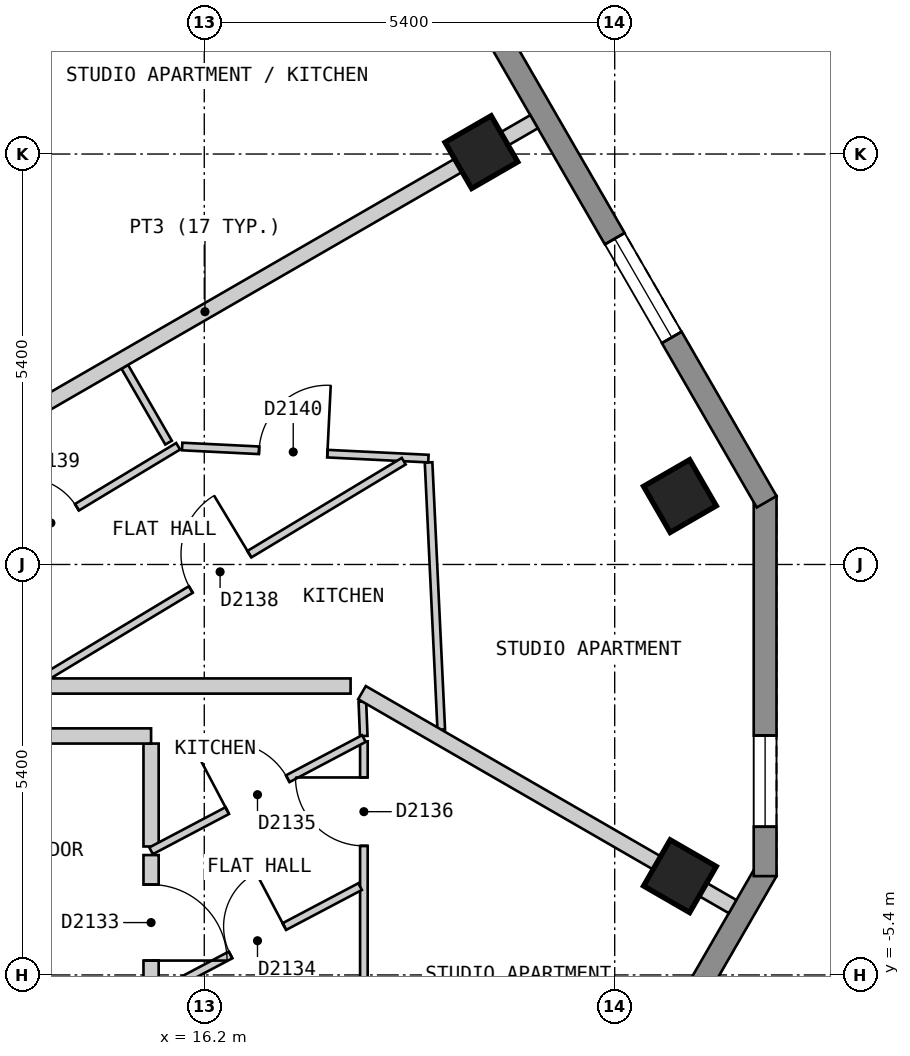
"""IFC4 building model, lengths in metres.
Left out: names, types, materials, properties, quantities, classifications, styles, units other than length and angle.
Written with IfcOpenShell. Run it as: python <this file> out.ifc"""

import sys

from ifc_helpers import new_model, si_unit, direction, frame, frame_2d, origin, origin_2d, place, context, subcontext, project, spatial, polyline, rectangle, outline, extrude, element, fill, save


model = new_model("IFC4")
c1 = context("Model", 3, precision=1e-05, world=origin(), true_north=direction((0.0, 1.0)))
c2 = subcontext(c1, "Body", "Model", "MODEL_VIEW")
j1 = project(units=[si_unit("LENGTHUNIT", "METRE"), si_unit("PLANEANGLEUNIT", "RADIAN")], contexts=[c1])
p1 = place(None, origin())
s1 = spatial("IfcSite", under=j1, at=p1, CompositionType="ELEMENT")
p2 = place(p1, origin())
s2 = spatial("IfcBuilding", under=s1, at=p2, CompositionType="ELEMENT")
p3 = place(p2, frame((0.0, 0.0, 211.8)))
s3 = spatial("IfcBuildingStorey", under=s2, at=p3, CompositionType="ELEMENT", Elevation=211.8)
for number, where, z_axis, x_axis in (
    (1, (22.458, -4.101, 0.0), (0.0, 0.0, 1.0), (0.5, 0.866, 0.0)),
    (2, (22.458, 0.9, 0.0), (0.0, 0.0, 1.0), (-0.5, 0.866, 0.0)),
    (3, (19.846, 5.425, 0.0), (0.0, 0.0, 1.0), (-0.5, 0.866, 0.0)),
):
    element("IfcColumn", number, at=place(p3, frame(where, z_axis=z_axis, x_axis=x_axis)), inside=s3, PredefinedType="COLUMN", context=c2, shape_type="SweptSolid", body=[
        extrude(rectangle(XDim=0.7, YDim=0.7, at=origin_2d()), origin(), (0.0, 0.0, 1.0), 3.0),
    ])
p4 = place(p3, frame((15.285, -18.425, 0.0), z_axis=(0.0, 0.0, 1.0), x_axis=(0.500012653391, 0.866018098222, 0.0)))
e4 = element("IfcWall", 4, at=p4, inside=s3, PredefinedType="SOLIDWALL", context=c2, shape_type="SweptSolid", body=[
    extrude(outline(polyline([(0.0, -0.15), (16.628, -0.15), (16.548, 0.15), (0.08, 0.15), (0.0, -0.15)])), origin(), (0.0, 0.0, 1.0), 2.7),
])
p5 = place(p4, frame((2.444, 0.0, 0.15)))
e5 = element("IfcOpeningElement", 5, at=p5, cuts=e4, PredefinedType="OPENING", context=c2, shape_type="SweptSolid", body=[
    extrude(rectangle(XDim=1.5, YDim=2.1, at=frame_2d((0.75, 1.05))), frame((0.0, 0.16, 0.0), z_axis=(0.0, -1.0, 0.0), x_axis=(1.0, 0.0, 0.0)), (0.0, 0.0, 1.0), 0.32),
])
p6 = place(p4, frame((7.564, 0.0, 0.15)))
e6 = element("IfcOpeningElement", 6, at=p6, cuts=e4, PredefinedType="OPENING", context=c2, shape_type="SweptSolid", body=[
    extrude(rectangle(XDim=1.5, YDim=2.1, at=frame_2d((0.75, 1.05))), frame((0.0, 0.16, 0.0), z_axis=(0.0, -1.0, 0.0), x_axis=(1.0, 0.0, 0.0)), (0.0, 0.0, 1.0), 0.32),
])
p7 = place(p4, frame((12.682, 0.0, 0.15)))
e7 = element("IfcOpeningElement", 7, at=p7, cuts=e4, PredefinedType="OPENING", context=c2, shape_type="SweptSolid", body=[
    extrude(rectangle(XDim=1.5, YDim=2.1, at=frame_2d((0.75, 1.05))), frame((0.0, 0.16, 0.0), z_axis=(0.0, -1.0, 0.0), x_axis=(1.0, 0.0, 0.0)), (0.0, 0.0, 1.0), 0.32),
])
p8 = place(p3, frame((23.579, -4.1, 0.0), z_axis=(0.0, 0.0, 1.0), x_axis=(0.0, 1.0, 0.0)))
e8 = element("IfcWall", 8, at=p8, inside=s3, PredefinedType="SOLIDWALL", context=c2, shape_type="SweptSolid", body=[
    extrude(outline(polyline([(0.0, -0.15), (5.0, -0.15), (4.92, 0.15), (0.08, 0.15), (0.0, -0.15)])), origin(), (0.0, 0.0, 1.0), 2.7),
])
p9 = place(p8, frame((0.65, 0.0, 0.15)))
e9 = element("IfcOpeningElement", 9, at=p9, cuts=e8, PredefinedType="OPENING", context=c2, shape_type="SweptSolid", body=[
    extrude(rectangle(XDim=1.2, YDim=2.1, at=frame_2d((0.6, 1.05))), frame((0.0, 0.16, 0.0), z_axis=(0.0, -1.0, 0.0), x_axis=(1.0, 0.0, 0.0)), (0.0, 0.0, 1.0), 0.32),
])
p10 = place(p3, frame((23.599, 0.825, 0.0), z_axis=(0.0, 0.0, 1.0), x_axis=(-0.500003656944, 0.866023292436, 0.0)))
e10 = element("IfcWall", 10, at=p10, inside=s3, PredefinedType="SOLIDWALL", context=c2, shape_type="SweptSolid", body=[
    extrude(outline(polyline([(0.0, -0.15), (22.17, -0.15), (22.09, 0.15), (0.08, 0.15), (0.0, -0.15)])), origin(), (0.0, 0.0, 1.0), 2.7),
])
p11 = place(p10, frame((2.497, 0.0, 0.15)))
e11 = element("IfcOpeningElement", 11, at=p11, cuts=e10, PredefinedType="OPENING", context=c2, shape_type="SweptSolid", body=[
    extrude(rectangle(XDim=1.5, YDim=2.1, at=frame_2d((0.75, 1.05))), frame((0.0, 0.16, 0.0), z_axis=(0.0, -1.0, 0.0), x_axis=(1.0, 0.0, 0.0)), (0.0, 0.0, 1.0), 0.32),
])
p12 = place(p10, frame((7.723, 0.0, 0.15)))
e12 = element("IfcOpeningElement", 12, at=p12, cuts=e10, PredefinedType="OPENING", context=c2, shape_type="SweptSolid", body=[
    extrude(rectangle(XDim=1.5, YDim=2.1, at=frame_2d((0.75, 1.05))), frame((0.0, 0.16, 0.0), z_axis=(0.0, -1.0, 0.0), x_axis=(1.0, 0.0, 0.0)), (0.0, 0.0, 1.0), 0.32),
])
p13 = place(p10, frame((12.948, 0.0, 0.15)))
e13 = element("IfcOpeningElement", 13, at=p13, cuts=e10, PredefinedType="OPENING", context=c2, shape_type="SweptSolid", body=[
    extrude(rectangle(XDim=1.5, YDim=2.1, at=frame_2d((0.75, 1.05))), frame((0.0, 0.16, 0.0), z_axis=(0.0, -1.0, 0.0), x_axis=(1.0, 0.0, 0.0)), (0.0, 0.0, 1.0), 0.32),
])
p14 = place(p10, frame((18.173, 0.0, 0.15)))
e14 = element("IfcOpeningElement", 14, at=p14, cuts=e10, PredefinedType="OPENING", context=c2, shape_type="SweptSolid", body=[
    extrude(rectangle(XDim=1.5, YDim=2.1, at=frame_2d((0.75, 1.05))), frame((0.0, 0.16, 0.0), z_axis=(0.0, -1.0, 0.0), x_axis=(1.0, 0.0, 0.0)), (0.0, 0.0, 1.0), 0.32),
])
p15 = place(p3, frame((15.5, -2.356, 0.0), z_axis=(0.0, 0.0, 1.0), x_axis=(0.0, -1.0, 0.0)))
e15 = element("IfcWall", 15, at=p15, inside=s3, PredefinedType="PARTITIONING", context=c2, shape_type="SweptSolid", body=[
    extrude(rectangle(XDim=1.354, YDim=0.2, at=frame_2d((0.677, 0.0))), origin(), (0.0, 0.0, 1.0), 2.7),
])
p16 = place(p3, frame((12.902, -2.256, 0.0), z_axis=(0.0, 0.0, 1.0), x_axis=(1.0, 0.0, 0.0)))
e16 = element("IfcWall", 16, at=p16, inside=s3, PredefinedType="PARTITIONING", context=c2, shape_type="SweptSolid", body=[
    extrude(rectangle(XDim=2.598, YDim=0.2, at=frame_2d((1.299, 0.0))), origin(), (0.0, 0.0, 1.0), 2.7),
])
p17 = place(p3, frame((15.5, -5.879, 0.0), z_axis=(0.0, 0.0, 1.0), x_axis=(0.0, 1.0, 0.0)))
e17 = element("IfcWall", 17, at=p17, inside=s3, PredefinedType="PARTITIONING", context=c2, shape_type="SweptSolid", body=[
    extrude(rectangle(XDim=2.056, YDim=0.2, at=frame_2d((1.028, 0.0))), origin(), (0.0, 0.0, 1.0), 2.7),
])
p18 = place(p17, frame((0.668, 0.0, 0.0)))
e18 = element("IfcOpeningElement", 18, at=p18, cuts=e17, PredefinedType="OPENING", context=c2, shape_type="SweptSolid", body=[
    extrude(rectangle(XDim=1.0, YDim=2.1, at=frame_2d((0.5, 1.05))), frame((0.0, 0.11, 0.0), z_axis=(0.0, -1.0, 0.0), x_axis=(1.0, 0.0, 0.0)), (0.0, 0.0, 1.0), 0.22),
])
p19 = place(p3, frame((15.154, 2.601, 0.0), z_axis=(0.0, 0.0, 1.0), x_axis=(0.499808046739, -0.866136199691, 0.0)))
e19 = element("IfcWall", 19, at=p19, inside=s3, PredefinedType="PARTITIONING", context=c2, shape_type="SweptSolid", body=[
    extrude(rectangle(XDim=1.152, YDim=0.1, at=frame_2d((0.576, 0.0))), origin(), (0.0, 0.0, 1.0), 2.7),
])
p20 = place(p3, frame((18.28, -1.804, 0.0), z_axis=(0.0, 0.0, 1.0), x_axis=(0.039839036731, -0.999206110446, 0.0)))
e20 = element("IfcWall", 20, at=p20, inside=s3, PredefinedType="PARTITIONING", context=c2, shape_type="SweptSolid", body=[
    extrude(rectangle(XDim=0.453, YDim=0.1, at=frame_2d((0.227, 0.0))), origin(), (0.0, 0.0, 1.0), 2.7),
])
p21 = place(p3, frame((19.151, 1.343, 0.0), z_axis=(0.0, 0.0, 1.0), x_axis=(0.047509130714, -0.998870803707, 0.0)))
e21 = element("IfcWall", 21, at=p21, inside=s3, PredefinedType="PARTITIONING", context=c2, shape_type="SweptSolid", body=[
    extrude(rectangle(XDim=3.52, YDim=0.1, at=frame_2d((1.76, 0.0))), origin(), (0.0, 0.0, 1.0), 2.7),
])
p22 = place(p3, frame((15.909, 1.552, 0.0), z_axis=(0.0, 0.0, 1.0), x_axis=(0.998799003463, -0.048995414909, 0.0)))
e22 = element("IfcWall", 22, at=p22, inside=s3, PredefinedType="PARTITIONING", context=c2, shape_type="SweptSolid", body=[
    extrude(rectangle(XDim=3.244, YDim=0.1, at=frame_2d((1.622, 0.0))), origin(), (0.0, 0.0, 1.0), 2.7),
])
p23 = place(p22, frame((1.013, 0.0, 0.0)))
e23 = element("IfcOpeningElement", 23, at=p23, cuts=e22, PredefinedType="OPENING", context=c2, shape_type="SweptSolid", body=[
    extrude(rectangle(XDim=0.9, YDim=2.1, at=frame_2d((0.45, 1.05))), frame((0.0, 0.06, 0.0), z_axis=(0.0, -1.0, 0.0), x_axis=(1.0, 0.0, 0.0)), (0.0, 0.0, 1.0), 0.12),
])
p24 = place(p3, frame((18.3, -7.496, 0.0), z_axis=(0.0, 0.0, 1.0), x_axis=(0.0, 1.0, 0.0)))
e24 = element("IfcWall", 24, at=p24, inside=s3, PredefinedType="PARTITIONING", context=c2, shape_type="SweptSolid", body=[
    extrude(rectangle(XDim=5.17, YDim=0.1, at=frame_2d((2.585, 0.0))), origin(), (0.0, 0.0, 1.0), 2.7),
])
p25 = place(p24, frame((3.794, 0.0, 0.0)))
e25 = element("IfcOpeningElement", 25, at=p25, cuts=e24, PredefinedType="OPENING", context=c2, shape_type="SweptSolid", body=[
    extrude(rectangle(XDim=0.9, YDim=2.1, at=frame_2d((0.45, 1.05))), frame((0.0, 0.06, 0.0), z_axis=(0.0, -1.0, 0.0), x_axis=(1.0, 0.0, 0.0)), (0.0, 0.0, 1.0), 0.12),
])
p26 = place(p3, frame((15.5, -3.767, 0.0), z_axis=(0.0, 0.0, 1.0), x_axis=(0.884482889541, 0.466572628976, 0.0)))
e26 = element("IfcWall", 26, at=p26, inside=s3, PredefinedType="PARTITIONING", context=c2, shape_type="SweptSolid", body=[
    extrude(rectangle(XDim=3.166, YDim=0.1, at=frame_2d((1.583, 0.0))), origin(), (0.0, 0.0, 1.0), 2.7),
])
p27 = place(p26, frame((1.133, 0.0, 0.0)))
e27 = element("IfcOpeningElement", 27, at=p27, cuts=e26, PredefinedType="OPENING", context=c2, shape_type="SweptSolid", body=[
    extrude(rectangle(XDim=0.9, YDim=2.1, at=frame_2d((0.45, 1.05))), frame((0.0, 0.06, 0.0), z_axis=(0.0, -1.0, 0.0), x_axis=(1.0, 0.0, 0.0)), (0.0, 0.0, 1.0), 0.12),
])
p28 = place(p3, frame((15.6, -5.636, 0.0), z_axis=(0.0, 0.0, 1.0), x_axis=(0.884468832747, 0.466599275503, 0.0)))
e28 = element("IfcWall", 28, at=p28, inside=s3, PredefinedType="PARTITIONING", context=c2, shape_type="SweptSolid", body=[
    extrude(rectangle(XDim=2.996, YDim=0.1, at=frame_2d((1.498, 0.0))), origin(), (0.0, 0.0, 1.0), 2.7),
])
p29 = place(p28, frame((1.07, 0.0, 0.0)))
e29 = element("IfcOpeningElement", 29, at=p29, cuts=e28, PredefinedType="OPENING", context=c2, shape_type="SweptSolid", body=[
    extrude(rectangle(XDim=0.8, YDim=2.1, at=frame_2d((0.4, 1.05))), frame((0.0, 0.06, 0.0), z_axis=(0.0, -1.0, 0.0), x_axis=(1.0, 0.0, 0.0)), (0.0, 0.0, 1.0), 0.12),
])
p30 = place(p3, frame((12.593, -0.411, 0.0), z_axis=(0.0, 0.0, 1.0), x_axis=(0.856558445359, 0.516050026339, 0.0)))
e30 = element("IfcWall", 30, at=p30, inside=s3, PredefinedType="PARTITIONING", context=c2, shape_type="SweptSolid", body=[
    extrude(rectangle(XDim=3.809, YDim=0.1, at=frame_2d((1.905, 0.0))), origin(), (0.0, 0.0, 1.0), 2.7),
])
p31 = place(p30, frame((1.455, 0.0, 0.0)))
e31 = element("IfcOpeningElement", 31, at=p31, cuts=e30, PredefinedType="OPENING", context=c2, shape_type="SweptSolid", body=[
    extrude(rectangle(XDim=0.8, YDim=2.1, at=frame_2d((0.4, 1.05))), frame((0.0, 0.06, 0.0), z_axis=(0.0, -1.0, 0.0), x_axis=(1.0, 0.0, 0.0)), (0.0, 0.0, 1.0), 0.12),
])
p32 = place(p3, frame((14.081, -1.499, 0.0), z_axis=(0.0, 0.0, 1.0), x_axis=(0.85652273816, 0.516109289798, 0.0)))
e32 = element("IfcWall", 32, at=p32, inside=s3, PredefinedType="PARTITIONING", context=c2, shape_type="SweptSolid", body=[
    extrude(rectangle(XDim=5.537, YDim=0.1, at=frame_2d((2.769, 0.0))), origin(), (0.0, 0.0, 1.0), 2.7),
])
p33 = place(p32, frame((2.267, 0.0, 0.0)))
e33 = element("IfcOpeningElement", 33, at=p33, cuts=e32, PredefinedType="OPENING", context=c2, shape_type="SweptSolid", body=[
    extrude(rectangle(XDim=0.9, YDim=2.1, at=frame_2d((0.45, 1.05))), frame((0.0, 0.06, 0.0), z_axis=(0.0, -1.0, 0.0), x_axis=(1.0, 0.0, 0.0)), (0.0, 0.0, 1.0), 0.12),
])
p34 = place(p3, frame((18.275, -1.686, 0.0), z_axis=(0.0, 0.0, 1.0), x_axis=(0.866041167766, -0.49997269499, 0.0)))
e34 = element("IfcWall", 34, at=p34, inside=s3, PredefinedType="PARTITIONING", context=c2, shape_type="SweptSolid", body=[
    extrude(rectangle(XDim=5.63, YDim=0.2, at=frame_2d((2.815, 0.0))), origin(), (0.0, 0.0, 1.0), 2.7),
])
p35 = place(p3, frame((13.163, -1.599, 0.0), z_axis=(0.0, 0.0, 1.0), x_axis=(1.0, 0.0, 0.0)))
e35 = element("IfcWall", 35, at=p35, inside=s3, PredefinedType="PARTITIONING", context=c2, shape_type="SweptSolid", body=[
    extrude(rectangle(XDim=4.962, YDim=0.2, at=frame_2d((2.481, 0.0))), origin(), (0.0, 0.0, 1.0), 2.7),
])
p36 = place(p3, frame((11.879, 0.826, 0.0), z_axis=(0.0, 0.0, 1.0), x_axis=(0.866065245018, 0.499930986609, 0.0)))
e36 = element("IfcWall", 36, at=p36, inside=s3, PredefinedType="PARTITIONING", context=c2, shape_type="SweptSolid", body=[
    extrude(rectangle(XDim=10.0, YDim=0.2, at=frame_2d((5.0, 0.0))), origin(), (0.0, 0.0, 1.0), 2.7),
])
p37 = place(p3, frame((9.354, 5.401, 0.0), z_axis=(0.0, 0.0, 1.0), x_axis=(0.866018411306, 0.500012111133, 0.0)))
e37 = element("IfcWall", 37, at=p37, inside=s3, PredefinedType="PARTITIONING", context=c2, shape_type="SweptSolid", body=[
    extrude(rectangle(XDim=9.898, YDim=0.2, at=frame_2d((4.949, 0.0))), origin(), (0.0, 0.0, 1.0), 2.7),
])
p38 = place(p9, origin())
e38 = element("IfcWindow", 38, at=p38, inside=s3, PartitioningType="SINGLE_PANEL", PredefinedType="WINDOW", context=c2, shape_type="SweptSolid", body=[
    extrude(rectangle(XDim=1.2, YDim=2.1, at=frame_2d((0.6, 1.05))), frame((0.0, 0.03, 0.0), z_axis=(0.0, -1.0, 0.0), x_axis=(1.0, 0.0, 0.0)), (0.0, 0.0, 1.0), 0.06),
])
fill(e9, e38)
p39 = place(p11, origin())
e39 = element("IfcWindow", 39, at=p39, inside=s3, PartitioningType="SINGLE_PANEL", PredefinedType="WINDOW", context=c2, shape_type="SweptSolid", body=[
    extrude(rectangle(XDim=1.5, YDim=2.1, at=frame_2d((0.75, 1.05))), frame((0.0, 0.03, 0.0), z_axis=(0.0, -1.0, 0.0), x_axis=(1.0, 0.0, 0.0)), (0.0, 0.0, 1.0), 0.06),
])
fill(e11, e39)
p40 = place(p18, origin())
e40 = element("IfcDoor", 40, at=p40, inside=s3, OperationType="SINGLE_SWING_LEFT", PredefinedType="DOOR", context=c2, shape_type="SweptSolid", body=[
    extrude(rectangle(XDim=1.0, YDim=2.1, at=frame_2d((0.5, 1.05))), frame((0.0, 0.025, 0.0), z_axis=(0.0, -1.0, 0.0), x_axis=(1.0, 0.0, 0.0)), (0.0, 0.0, 1.0), 0.05),
])
fill(e18, e40)
p41 = place(p29, origin())
e41 = element("IfcDoor", 41, at=p41, inside=s3, OperationType="SINGLE_SWING_RIGHT", PredefinedType="DOOR", context=c2, shape_type="SweptSolid", body=[
    extrude(rectangle(XDim=0.8, YDim=2.1, at=frame_2d((0.4, 1.05))), frame((0.0, 0.025, 0.0), z_axis=(0.0, -1.0, 0.0), x_axis=(1.0, 0.0, 0.0)), (0.0, 0.0, 1.0), 0.05),
])
fill(e29, e41)
p42 = place(p27, origin())
e42 = element("IfcDoor", 42, at=p42, inside=s3, OperationType="SINGLE_SWING_LEFT", PredefinedType="DOOR", context=c2, shape_type="SweptSolid", body=[
    extrude(rectangle(XDim=0.9, YDim=2.1, at=frame_2d((0.45, 1.05))), frame((0.0, 0.025, 0.0), z_axis=(0.0, -1.0, 0.0), x_axis=(1.0, 0.0, 0.0)), (0.0, 0.0, 1.0), 0.05),
])
fill(e27, e42)
p43 = place(p25, origin())
e43 = element("IfcDoor", 43, at=p43, inside=s3, OperationType="SINGLE_SWING_RIGHT", PredefinedType="DOOR", context=c2, shape_type="SweptSolid", body=[
    extrude(rectangle(XDim=0.9, YDim=2.1, at=frame_2d((0.45, 1.05))), frame((0.0, 0.025, 0.0), z_axis=(0.0, -1.0, 0.0), x_axis=(1.0, 0.0, 0.0)), (0.0, 0.0, 1.0), 0.05),
])
fill(e25, e43)
p44 = place(p33, origin())
e44 = element("IfcDoor", 44, at=p44, inside=s3, OperationType="SINGLE_SWING_RIGHT", PredefinedType="DOOR", context=c2, shape_type="SweptSolid", body=[
    extrude(rectangle(XDim=0.9, YDim=2.1, at=frame_2d((0.45, 1.05))), frame((0.0, 0.025, 0.0), z_axis=(0.0, -1.0, 0.0), x_axis=(1.0, 0.0, 0.0)), (0.0, 0.0, 1.0), 0.05),
])
fill(e33, e44)
p45 = place(p31, origin())
e45 = element("IfcDoor", 45, at=p45, inside=s3, OperationType="SINGLE_SWING_LEFT", PredefinedType="DOOR", context=c2, shape_type="SweptSolid", body=[
    extrude(rectangle(XDim=0.8, YDim=2.1, at=frame_2d((0.4, 1.05))), frame((0.0, 0.025, 0.0), z_axis=(0.0, -1.0, 0.0), x_axis=(1.0, 0.0, 0.0)), (0.0, 0.0, 1.0), 0.05),
])
fill(e31, e45)
p46 = place(p23, origin())
e46 = element("IfcDoor", 46, at=p46, inside=s3, OperationType="SINGLE_SWING_RIGHT", PredefinedType="DOOR", context=c2, shape_type="SweptSolid", body=[
    extrude(rectangle(XDim=0.9, YDim=2.1, at=frame_2d((0.45, 1.05))), frame((0.0, 0.025, 0.0), z_axis=(0.0, -1.0, 0.0), x_axis=(1.0, 0.0, 0.0)), (0.0, 0.0, 1.0), 0.05),
])
fill(e23, e46)
save(model, sys.argv[1])
